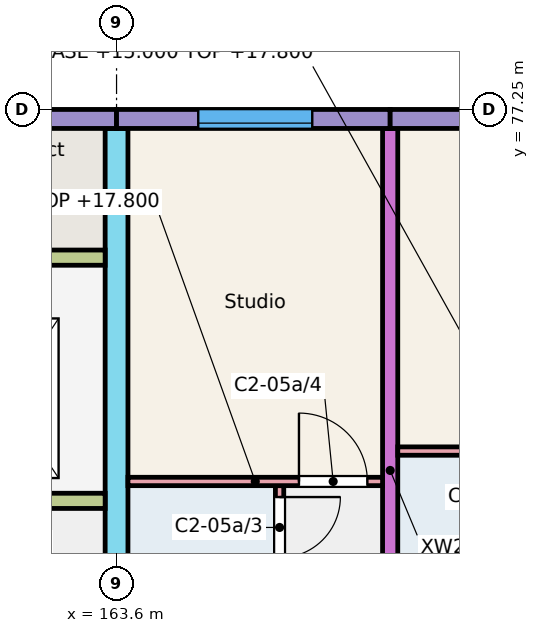
"""IFC4 building model, lengths in metres.
Left out: names, types, materials, properties, quantities, classifications, styles, units other than length and angle.
Written with IfcOpenShell. Run it as: python <this file> out.ifc"""

import sys

from ifc_helpers import new_model, si_unit, direction, frame, frame_2d, origin, place, context, subcontext, project, spatial, rectangle, extrude, element, fill, save


model = new_model("IFC4")
c1 = context("Model", 3, precision=1e-05, world=origin(), true_north=direction((0.0, 1.0)))
c2 = subcontext(c1, "Body", "Model", "MODEL_VIEW")
j1 = project(units=[si_unit("LENGTHUNIT", "METRE"), si_unit("PLANEANGLEUNIT", "RADIAN")], contexts=[c1])
p1 = place(None, origin())
s1 = spatial("IfcSite", under=j1, at=p1, CompositionType="ELEMENT")
p2 = place(p1, origin())
s2 = spatial("IfcBuilding", under=s1, at=p2, CompositionType="ELEMENT")
p3 = place(p2, frame((0.0, 0.0, 15.0)))
s3 = spatial("IfcBuildingStorey", under=s2, at=p3, CompositionType="ELEMENT", Elevation=15.0)
p4 = place(p3, frame((163.6, 66.0, 0.0), z_axis=(0.0, 0.0, 1.0), x_axis=(0.0, 1.0, 0.0)))
e1 = element("IfcWall", 1, at=p4, inside=s3, PredefinedType="SHEAR", context=c2, shape_type="SweptSolid", body=[
    extrude(rectangle(XDim=11.0, YDim=0.3, at=frame_2d((5.5, 0.0))), origin(), (0.0, 0.0, 1.0), 3.0),
])
p5 = place(p4, frame((0.3, 0.0, 0.0)))
e2 = element("IfcOpeningElement", 2, at=p5, cuts=e1, PredefinedType="OPENING", context=c2, shape_type="SweptSolid", body=[
    extrude(rectangle(XDim=1.2, YDim=2.1, at=frame_2d((0.6, 1.05))), frame((0.0, 0.16, 0.0), z_axis=(0.0, -1.0, 0.0), x_axis=(1.0, 0.0, 0.0)), (0.0, 0.0, 1.0), 0.32),
])
p6 = place(p3, frame((167.2, 68.0, 0.0), z_axis=(0.0, 0.0, 1.0), x_axis=(0.0, 1.0, 0.0)))
e3 = element("IfcWall", 3, at=p6, inside=s3, PredefinedType="SHEAR", context=c2, shape_type="SweptSolid", body=[
    extrude(rectangle(XDim=9.0, YDim=0.2, at=frame_2d((4.5, 0.0))), origin(), (0.0, 0.0, 1.0), 3.0),
])
p7 = place(p3, frame((160.625, 77.125, 0.0), z_axis=(0.0, 0.0, 1.0), x_axis=(1.0, 0.0, 0.0)))
e4 = element("IfcWall", 4, at=p7, inside=s3, PredefinedType="SOLIDWALL", context=c2, shape_type="SweptSolid", body=[
    extrude(rectangle(XDim=2.975, YDim=0.25, at=frame_2d((1.488, 0.0))), origin(), (0.0, 0.0, 1.0), 3.0),
])
p8 = place(p3, frame((157.725, 72.1, 0.0), z_axis=(0.0, 0.0, 1.0), x_axis=(1.0, 0.0, 0.0)))
e5 = element("IfcWall", 5, at=p8, inside=s3, PredefinedType="SHEAR", context=c2, shape_type="SweptSolid", body=[
    extrude(rectangle(XDim=5.725, YDim=0.2, at=frame_2d((2.862, 0.0))), origin(), (0.0, 0.0, 1.0), 3.0),
])
p9 = place(p8, frame((0.95, 0.0, 0.0)))
e6 = element("IfcOpeningElement", 6, at=p9, cuts=e5, PredefinedType="OPENING", context=c2, shape_type="SweptSolid", body=[
    extrude(rectangle(XDim=1.0, YDim=2.1, at=frame_2d((0.5, 1.05))), frame((0.0, 0.11, 0.0), z_axis=(0.0, -1.0, 0.0), x_axis=(1.0, 0.0, 0.0)), (0.0, 0.0, 1.0), 0.22),
])
p10 = place(p8, frame((3.863, 0.0, 0.0)))
e7 = element("IfcOpeningElement", 7, at=p10, cuts=e5, PredefinedType="OPENING", context=c2, shape_type="SweptSolid", body=[
    extrude(rectangle(XDim=1.1, YDim=2.1, at=frame_2d((0.55, 1.05))), frame((0.0, 0.11, 0.0), z_axis=(0.0, -1.0, 0.0), x_axis=(1.0, 0.0, 0.0)), (0.0, 0.0, 1.0), 0.22),
])
p11 = place(p3, frame((160.825, 75.3, 0.0), z_axis=(0.0, 0.0, 1.0), x_axis=(1.0, 0.0, 0.0)))
e8 = element("IfcWall", 8, at=p11, inside=s3, PredefinedType="SHEAR", context=c2, shape_type="SweptSolid", body=[
    extrude(rectangle(XDim=2.625, YDim=0.2, at=frame_2d((1.312, 0.0))), origin(), (0.0, 0.0, 1.0), 3.0),
])
p12 = place(p3, frame((163.6, 77.125, 0.0), z_axis=(0.0, 0.0, 1.0), x_axis=(1.0, 0.0, 0.0)))
e9 = element("IfcWall", 9, at=p12, inside=s3, PredefinedType="SOLIDWALL", context=c2, shape_type="SweptSolid", body=[
    extrude(rectangle(XDim=3.6, YDim=0.25, at=frame_2d((1.8, 0.0))), origin(), (0.0, 0.0, 1.0), 3.0),
])
p13 = place(p12, frame((1.075, 0.0, 0.9)))
e10 = element("IfcOpeningElement", 10, at=p13, cuts=e9, PredefinedType="OPENING", context=c2, shape_type="SweptSolid", body=[
    extrude(rectangle(XDim=1.5, YDim=1.5, at=frame_2d((0.75, 0.75))), frame((0.0, 0.135, 0.0), z_axis=(0.0, -1.0, 0.0), x_axis=(1.0, 0.0, 0.0)), (0.0, 0.0, 1.0), 0.27),
])
p14 = place(p3, frame((167.2, 77.125, 0.0), z_axis=(0.0, 0.0, 1.0), x_axis=(1.0, 0.0, 0.0)))
e11 = element("IfcWall", 11, at=p14, inside=s3, PredefinedType="SOLIDWALL", context=c2, shape_type="SweptSolid", body=[
    extrude(rectangle(XDim=3.6, YDim=0.25, at=frame_2d((1.8, 0.0))), origin(), (0.0, 0.0, 1.0), 3.0),
])
p15 = place(p14, frame((1.05, 0.0, 0.9)))
e12 = element("IfcOpeningElement", 12, at=p15, cuts=e11, PredefinedType="OPENING", context=c2, shape_type="SweptSolid", body=[
    extrude(rectangle(XDim=1.5, YDim=1.5, at=frame_2d((0.75, 0.75))), frame((0.0, 0.135, 0.0), z_axis=(0.0, -1.0, 0.0), x_axis=(1.0, 0.0, 0.0)), (0.0, 0.0, 1.0), 0.27),
])
p16 = place(p3, frame((165.745, 68.0, 0.0), z_axis=(0.0, 0.0, 1.0), x_axis=(0.0, 1.0, 0.0)))
e13 = element("IfcWall", 13, at=p16, inside=s3, PredefinedType="PARTITIONING", context=c2, shape_type="SweptSolid", body=[
    extrude(rectangle(XDim=4.3, YDim=0.11, at=frame_2d((2.15, 0.0))), origin(), (0.0, 0.0, 1.0), 2.8),
])
p17 = place(p16, frame((0.2, 0.0, 0.0)))
e14 = element("IfcOpeningElement", 14, at=p17, cuts=e13, PredefinedType="OPENING", context=c2, shape_type="SweptSolid", body=[
    extrude(rectangle(XDim=0.8, YDim=2.1, at=frame_2d((0.4, 1.05))), frame((0.0, 0.065, 0.0), z_axis=(0.0, -1.0, 0.0), x_axis=(1.0, 0.0, 0.0)), (0.0, 0.0, 1.0), 0.13),
])
p18 = place(p16, frame((3.35, 0.0, 0.0)))
e15 = element("IfcOpeningElement", 15, at=p18, cuts=e13, PredefinedType="OPENING", context=c2, shape_type="SweptSolid", body=[
    extrude(rectangle(XDim=0.8, YDim=2.1, at=frame_2d((0.4, 1.05))), frame((0.0, 0.065, 0.0), z_axis=(0.0, -1.0, 0.0), x_axis=(1.0, 0.0, 0.0)), (0.0, 0.0, 1.0), 0.13),
])
p19 = place(p3, frame((163.75, 72.355, 0.0), z_axis=(0.0, 0.0, 1.0), x_axis=(1.0, 0.0, 0.0)))
e16 = element("IfcWall", 16, at=p19, inside=s3, PredefinedType="PARTITIONING", context=c2, shape_type="SweptSolid", body=[
    extrude(rectangle(XDim=3.35, YDim=0.11, at=frame_2d((1.675, 0.0))), origin(), (0.0, 0.0, 1.0), 2.8),
])
p20 = place(p19, frame((2.25, 0.0, 0.0)))
e17 = element("IfcOpeningElement", 17, at=p20, cuts=e16, PredefinedType="OPENING", context=c2, shape_type="SweptSolid", body=[
    extrude(rectangle(XDim=0.9, YDim=2.1, at=frame_2d((0.45, 1.05))), frame((0.0, 0.065, 0.0), z_axis=(0.0, -1.0, 0.0), x_axis=(1.0, 0.0, 0.0)), (0.0, 0.0, 1.0), 0.13),
])
p21 = place(p3, frame((167.3, 72.755, 0.0), z_axis=(0.0, 0.0, 1.0), x_axis=(1.0, 0.0, 0.0)))
e18 = element("IfcWall", 18, at=p21, inside=s3, PredefinedType="PARTITIONING", context=c2, shape_type="SweptSolid", body=[
    extrude(rectangle(XDim=3.4, YDim=0.11, at=frame_2d((1.7, 0.0))), origin(), (0.0, 0.0, 1.0), 2.8),
])
p22 = place(p21, frame((2.3, 0.0, 0.0)))
e19 = element("IfcOpeningElement", 19, at=p22, cuts=e18, PredefinedType="OPENING", context=c2, shape_type="SweptSolid", body=[
    extrude(rectangle(XDim=0.9, YDim=2.1, at=frame_2d((0.45, 1.05))), frame((0.0, 0.065, 0.0), z_axis=(0.0, -1.0, 0.0), x_axis=(1.0, 0.0, 0.0)), (0.0, 0.0, 1.0), 0.13),
])
p23 = place(p13, origin())
e20 = element("IfcWindow", 20, at=p23, inside=s3, PartitioningType="SINGLE_PANEL", PredefinedType="WINDOW", context=c2, shape_type="SweptSolid", body=[
    extrude(rectangle(XDim=1.5, YDim=1.5, at=frame_2d((0.75, 0.75))), frame((0.0, -0.025, 0.0), z_axis=(0.0, -1.0, 0.0), x_axis=(1.0, 0.0, 0.0)), (0.0, 0.0, 1.0), 0.06),
])
fill(e10, e20)
p24 = place(p18, origin())
e21 = element("IfcDoor", 21, at=p24, inside=s3, OperationType="SINGLE_SWING_RIGHT", PredefinedType="DOOR", context=c2, shape_type="SweptSolid", body=[
    extrude(rectangle(XDim=0.8, YDim=2.1, at=frame_2d((0.4, 1.05))), frame((0.0, 0.025, 0.0), z_axis=(0.0, -1.0, 0.0), x_axis=(1.0, 0.0, 0.0)), (0.0, 0.0, 1.0), 0.05),
])
fill(e15, e21)
p25 = place(p20, origin())
e22 = element("IfcDoor", 22, at=p25, inside=s3, OperationType="SINGLE_SWING_LEFT", PredefinedType="DOOR", context=c2, shape_type="SweptSolid", body=[
    extrude(rectangle(XDim=0.9, YDim=2.1, at=frame_2d((0.45, 1.05))), frame((0.0, 0.025, 0.0), z_axis=(0.0, -1.0, 0.0), x_axis=(1.0, 0.0, 0.0)), (0.0, 0.0, 1.0), 0.05),
])
fill(e17, e22)
save(model, sys.argv[1])
